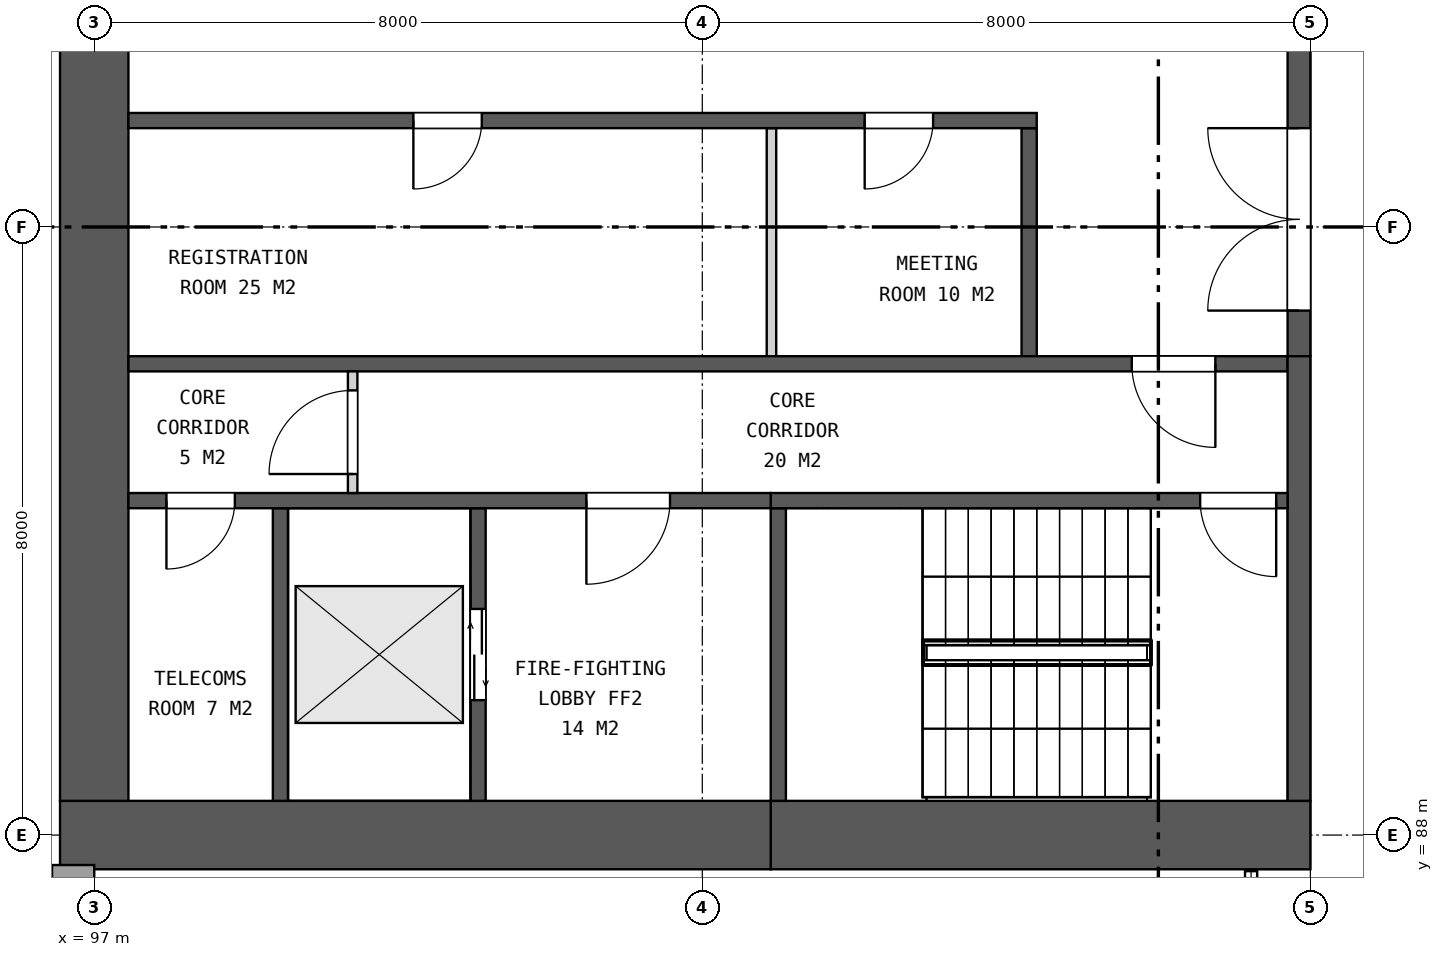
"""IFC4 building model, lengths in metres.
Left out: names, types, materials, properties, quantities, classifications, styles, units other than length and angle.
Written with IfcOpenShell. Run it as: python <this file> out.ifc"""

import sys

from ifc_helpers import new_model, si_unit, direction, frame, frame_2d, origin, place, context, subcontext, project, spatial, rectangle, extrude, element, fill, save


model = new_model("IFC4")
c1 = context("Model", 3, precision=1e-05, world=origin(), true_north=direction((0.0, 1.0)))
c2 = subcontext(c1, "Body", "Model", "MODEL_VIEW")
j1 = project(units=[si_unit("LENGTHUNIT", "METRE"), si_unit("PLANEANGLEUNIT", "RADIAN")], contexts=[c1])
p1 = place(None, origin())
s1 = spatial("IfcSite", under=j1, at=p1, CompositionType="ELEMENT")
p2 = place(p1, origin())
s2 = spatial("IfcBuilding", under=s1, at=p2, CompositionType="ELEMENT")
p3 = place(p2, frame((0.0, 0.0, 25.0)))
s3 = spatial("IfcBuildingStorey", under=s2, at=p3, CompositionType="ELEMENT", Elevation=25.0)
p4 = place(p3, frame((113.0, 88.0, 0.0), z_axis=(0.0, 0.0, 1.0), x_axis=(-1.0, 0.0, 0.0)))
e1 = element("IfcWall", 1, at=p4, inside=s3, PredefinedType="SHEAR", context=c2, shape_type="SweptSolid", body=[
    extrude(rectangle(XDim=7.1, YDim=0.9, at=frame_2d((3.55, 0.0))), origin(), (0.0, 0.0, 1.0), 9.0),
])
p5 = place(p3, frame((105.9, 88.0, 0.0), z_axis=(0.0, 0.0, 1.0), x_axis=(-1.0, 0.0, 0.0)))
e2 = element("IfcWall", 2, at=p5, inside=s3, PredefinedType="SHEAR", context=c2, shape_type="SweptSolid", body=[
    extrude(rectangle(XDim=9.35, YDim=0.9, at=frame_2d((4.675, 0.0))), origin(), (0.0, 0.0, 1.0), 9.0),
])
p6 = place(p3, frame((97.0, 111.55, 0.0), z_axis=(0.0, 0.0, 1.0), x_axis=(0.0, -1.0, 0.0)))
e3 = element("IfcWall", 3, at=p6, inside=s3, PredefinedType="SHEAR", context=c2, shape_type="SweptSolid", body=[
    extrude(rectangle(XDim=23.1, YDim=0.9, at=frame_2d((11.55, 0.0))), origin(), (0.0, 0.0, 1.0), 9.0),
])
p7 = place(p6, frame((10.35, 0.0, 0.0)))
e4 = element("IfcOpeningElement", 4, at=p7, cuts=e3, PredefinedType="OPENING", context=c2, shape_type="SweptSolid", body=[
    extrude(rectangle(XDim=2.4, YDim=2.4, at=frame_2d((1.2, 1.2))), frame((0.0, 0.46, 0.0), z_axis=(0.0, -1.0, 0.0), x_axis=(1.0, 0.0, 0.0)), (0.0, 0.0, 1.0), 0.92),
])
p8 = place(p3, frame((112.85, 105.7, 0.0), z_axis=(0.0, 0.0, 1.0), x_axis=(0.0, -1.0, 0.0)))
e5 = element("IfcWall", 5, at=p8, inside=s3, PredefinedType="SHEAR", context=c2, shape_type="SweptSolid", body=[
    extrude(rectangle(XDim=11.4, YDim=0.3, at=frame_2d((5.7, 0.0))), origin(), (0.0, 0.0, 1.0), 9.0),
])
p9 = place(p8, frame((0.6, 0.0, 0.0)))
e6 = element("IfcOpeningElement", 6, at=p9, cuts=e5, PredefinedType="OPENING", context=c2, shape_type="SweptSolid", body=[
    extrude(rectangle(XDim=2.4, YDim=2.4, at=frame_2d((1.2, 1.2))), frame((0.0, 0.16, 0.0), z_axis=(0.0, -1.0, 0.0), x_axis=(1.0, 0.0, 0.0)), (0.0, 0.0, 1.0), 0.32),
])
p10 = place(p8, frame((4.5, 0.0, 0.0)))
e7 = element("IfcOpeningElement", 7, at=p10, cuts=e5, PredefinedType="OPENING", context=c2, shape_type="SweptSolid", body=[
    extrude(rectangle(XDim=2.4, YDim=2.4, at=frame_2d((1.2, 1.2))), frame((0.0, 0.16, 0.0), z_axis=(0.0, -1.0, 0.0), x_axis=(1.0, 0.0, 0.0)), (0.0, 0.0, 1.0), 0.32),
])
p11 = place(p8, frame((8.4, 0.0, 0.0)))
e8 = element("IfcOpeningElement", 8, at=p11, cuts=e5, PredefinedType="OPENING", context=c2, shape_type="SweptSolid", body=[
    extrude(rectangle(XDim=2.4, YDim=2.4, at=frame_2d((1.2, 1.2))), frame((0.0, 0.16, 0.0), z_axis=(0.0, -1.0, 0.0), x_axis=(1.0, 0.0, 0.0)), (0.0, 0.0, 1.0), 0.32),
])
p12 = place(p3, frame((109.3, 97.3, 0.0), z_axis=(0.0, 0.0, 1.0), x_axis=(0.0, -1.0, 0.0)))
e9 = element("IfcWall", 9, at=p12, inside=s3, PredefinedType="SHEAR", context=c2, shape_type="SweptSolid", body=[
    extrude(rectangle(XDim=3.0, YDim=0.2, at=frame_2d((1.5, 0.0))), origin(), (0.0, 0.0, 1.0), 9.0),
])
p13 = place(p3, frame((105.91, 97.3, 0.0), z_axis=(0.0, 0.0, 1.0), x_axis=(0.0, -1.0, 0.0)))
e10 = element("IfcWall", 10, at=p13, inside=s3, PredefinedType="PARTITIONING", context=c2, shape_type="SweptSolid", body=[
    extrude(rectangle(XDim=3.0, YDim=0.125, at=frame_2d((1.5, 0.0))), origin(), (0.0, 0.0, 1.0), 9.0),
])
p14 = place(p3, frame((109.4, 97.4, 0.0), z_axis=(0.0, 0.0, 1.0), x_axis=(-1.0, 0.0, 0.0)))
e11 = element("IfcWall", 11, at=p14, inside=s3, PredefinedType="SHEAR", context=c2, shape_type="SweptSolid", body=[
    extrude(rectangle(XDim=11.95, YDim=0.2, at=frame_2d((5.975, 0.0))), origin(), (0.0, 0.0, 1.0), 9.0),
])
p15 = place(p14, frame((1.364, 0.0, 0.0)))
e12 = element("IfcOpeningElement", 12, at=p15, cuts=e11, PredefinedType="OPENING", context=c2, shape_type="SweptSolid", body=[
    extrude(rectangle(XDim=0.9, YDim=2.1, at=frame_2d((0.45, 1.05))), frame((0.0, 0.11, 0.0), z_axis=(0.0, -1.0, 0.0), x_axis=(1.0, 0.0, 0.0)), (0.0, 0.0, 1.0), 0.22),
])
p16 = place(p14, frame((7.301, 0.0, 0.0)))
e13 = element("IfcOpeningElement", 13, at=p16, cuts=e11, PredefinedType="OPENING", context=c2, shape_type="SweptSolid", body=[
    extrude(rectangle(XDim=0.9, YDim=2.1, at=frame_2d((0.45, 1.05))), frame((0.0, 0.11, 0.0), z_axis=(0.0, -1.0, 0.0), x_axis=(1.0, 0.0, 0.0)), (0.0, 0.0, 1.0), 0.22),
])
p17 = place(p3, frame((112.7, 94.2, 0.0), z_axis=(0.0, 0.0, 1.0), x_axis=(-1.0, 0.0, 0.0)))
e14 = element("IfcWall", 14, at=p17, inside=s3, PredefinedType="SHEAR", context=c2, shape_type="SweptSolid", body=[
    extrude(rectangle(XDim=15.25, YDim=0.2, at=frame_2d((7.625, 0.0))), origin(), (0.0, 0.0, 1.0), 9.0),
])
p18 = place(p17, frame((0.95, 0.0, 0.0)))
e15 = element("IfcOpeningElement", 15, at=p18, cuts=e14, PredefinedType="OPENING", context=c2, shape_type="SweptSolid", body=[
    extrude(rectangle(XDim=1.1, YDim=2.1, at=frame_2d((0.55, 1.05))), frame((0.0, 0.11, 0.0), z_axis=(0.0, -1.0, 0.0), x_axis=(1.0, 0.0, 0.0)), (0.0, 0.0, 1.0), 0.22),
])
p19 = place(p3, frame((112.85, 94.3, 0.0), z_axis=(0.0, 0.0, 1.0), x_axis=(0.0, -1.0, 0.0)))
e16 = element("IfcWall", 16, at=p19, inside=s3, PredefinedType="SHEAR", context=c2, shape_type="SweptSolid", body=[
    extrude(rectangle(XDim=5.85, YDim=0.3, at=frame_2d((2.925, 0.0))), origin(), (0.0, 0.0, 1.0), 9.0),
])
p20 = place(p3, frame((106.0, 92.3, 0.0), z_axis=(0.0, 0.0, 1.0), x_axis=(0.0, -1.0, 0.0)))
e17 = element("IfcWall", 17, at=p20, inside=s3, PredefinedType="SHEAR", context=c2, shape_type="SweptSolid", body=[
    extrude(rectangle(XDim=3.85, YDim=0.2, at=frame_2d((1.925, 0.0))), origin(), (0.0, 0.0, 1.0), 9.0),
])
p21 = place(p3, frame((102.05, 92.3, 0.0), z_axis=(0.0, 0.0, 1.0), x_axis=(0.0, -1.0, 0.0)))
e18 = element("IfcWall", 18, at=p21, inside=s3, PredefinedType="SHEAR", context=c2, shape_type="SweptSolid", body=[
    extrude(rectangle(XDim=3.85, YDim=0.2, at=frame_2d((1.925, 0.0))), origin(), (0.0, 0.0, 1.0), 9.0),
])
p22 = place(p21, frame((1.325, 0.0, 0.0)))
e19 = element("IfcOpeningElement", 19, at=p22, cuts=e18, PredefinedType="OPENING", context=c2, shape_type="SweptSolid", body=[
    extrude(rectangle(XDim=1.2, YDim=2.1, at=frame_2d((0.6, 1.05))), frame((0.0, 0.11, 0.0), z_axis=(0.0, -1.0, 0.0), x_axis=(1.0, 0.0, 0.0)), (0.0, 0.0, 1.0), 0.22),
])
p23 = place(p3, frame((99.45, 92.3, 0.0), z_axis=(0.0, 0.0, 1.0), x_axis=(0.0, -1.0, 0.0)))
e20 = element("IfcWall", 20, at=p23, inside=s3, PredefinedType="SHEAR", context=c2, shape_type="SweptSolid", body=[
    extrude(rectangle(XDim=3.85, YDim=0.2, at=frame_2d((1.925, 0.0))), origin(), (0.0, 0.0, 1.0), 9.0),
])
p24 = place(p3, frame((112.7, 92.4, 0.0), z_axis=(0.0, 0.0, 1.0), x_axis=(-1.0, 0.0, 0.0)))
e21 = element("IfcWall", 21, at=p24, inside=s3, PredefinedType="SHEAR", context=c2, shape_type="SweptSolid", body=[
    extrude(rectangle(XDim=6.8, YDim=0.2, at=frame_2d((3.4, 0.0))), origin(), (0.0, 0.0, 1.0), 9.0),
])
p25 = place(p24, frame((0.15, 0.0, 0.0)))
e22 = element("IfcOpeningElement", 22, at=p25, cuts=e21, PredefinedType="OPENING", context=c2, shape_type="SweptSolid", body=[
    extrude(rectangle(XDim=1.0, YDim=2.1, at=frame_2d((0.5, 1.05))), frame((0.0, 0.11, 0.0), z_axis=(0.0, -1.0, 0.0), x_axis=(1.0, 0.0, 0.0)), (0.0, 0.0, 1.0), 0.22),
])
p26 = place(p3, frame((105.9, 92.4, 0.0), z_axis=(0.0, 0.0, 1.0), x_axis=(-1.0, 0.0, 0.0)))
e23 = element("IfcWall", 23, at=p26, inside=s3, PredefinedType="SHEAR", context=c2, shape_type="SweptSolid", body=[
    extrude(rectangle(XDim=8.45, YDim=0.2, at=frame_2d((4.225, 0.0))), origin(), (0.0, 0.0, 1.0), 9.0),
])
p27 = place(p26, frame((1.325, 0.0, 0.0)))
e24 = element("IfcOpeningElement", 24, at=p27, cuts=e23, PredefinedType="OPENING", context=c2, shape_type="SweptSolid", body=[
    extrude(rectangle(XDim=1.1, YDim=2.1, at=frame_2d((0.55, 1.05))), frame((0.0, 0.11, 0.0), z_axis=(0.0, -1.0, 0.0), x_axis=(1.0, 0.0, 0.0)), (0.0, 0.0, 1.0), 0.22),
])
p28 = place(p26, frame((7.05, 0.0, 0.0)))
e25 = element("IfcOpeningElement", 25, at=p28, cuts=e23, PredefinedType="OPENING", context=c2, shape_type="SweptSolid", body=[
    extrude(rectangle(XDim=0.9, YDim=2.1, at=frame_2d((0.45, 1.05))), frame((0.0, 0.11, 0.0), z_axis=(0.0, -1.0, 0.0), x_axis=(1.0, 0.0, 0.0)), (0.0, 0.0, 1.0), 0.22),
])
p29 = place(p3, frame((100.4, 94.1, 0.0), z_axis=(0.0, 0.0, 1.0), x_axis=(0.0, -1.0, 0.0)))
e26 = element("IfcWall", 26, at=p29, inside=s3, PredefinedType="PARTITIONING", context=c2, shape_type="SweptSolid", body=[
    extrude(rectangle(XDim=1.6, YDim=0.125, at=frame_2d((0.8, 0.0))), origin(), (0.0, 0.0, 1.0), 9.0),
])
p30 = place(p29, frame((0.25, 0.0, 0.0)))
e27 = element("IfcOpeningElement", 27, at=p30, cuts=e26, PredefinedType="OPENING", context=c2, shape_type="SweptSolid", body=[
    extrude(rectangle(XDim=1.1, YDim=2.1, at=frame_2d((0.55, 1.05))), frame((0.0, 0.073, 0.0), z_axis=(0.0, -1.0, 0.0), x_axis=(1.0, 0.0, 0.0)), (0.0, 0.0, 1.0), 0.145),
])
p31 = place(p3, frame((96.445, 87.453, 0.0), z_axis=(0.0, 0.0, 1.0), x_axis=(1.0, 0.0, 0.0)))
e28 = element("IfcWall", 28, at=p31, inside=s3, PredefinedType="SOLIDWALL", context=c2, shape_type="SweptSolid", body=[
    extrude(rectangle(XDim=0.555, YDim=0.306, at=frame_2d((0.277, 0.0))), origin(), (0.0, 0.0, 1.0), 8.6),
])
p32 = place(p11, frame((2.4, 0.0, 0.0), z_axis=(0.0, 0.0, 1.0), x_axis=(-1.0, 0.0, 0.0)))
e29 = element("IfcDoor", 29, at=p32, inside=s3, OperationType="DOUBLE_DOOR_SINGLE_SWING", PredefinedType="DOOR", context=c2, shape_type="SweptSolid", body=[
    extrude(rectangle(XDim=2.4, YDim=2.4, at=frame_2d((1.2, 1.2))), frame((0.0, 0.025, 0.0), z_axis=(0.0, -1.0, 0.0), x_axis=(1.0, 0.0, 0.0)), (0.0, 0.0, 1.0), 0.05),
])
fill(e8, e29)
p33 = place(p15, origin())
e30 = element("IfcDoor", 30, at=p33, inside=s3, OperationType="SINGLE_SWING_RIGHT", PredefinedType="DOOR", context=c2, shape_type="SweptSolid", body=[
    extrude(rectangle(XDim=0.9, YDim=2.1, at=frame_2d((0.45, 1.05))), frame((0.0, 0.025, 0.0), z_axis=(0.0, -1.0, 0.0), x_axis=(1.0, 0.0, 0.0)), (0.0, 0.0, 1.0), 0.05),
])
fill(e12, e30)
p34 = place(p16, origin())
e31 = element("IfcDoor", 31, at=p34, inside=s3, OperationType="SINGLE_SWING_RIGHT", PredefinedType="DOOR", context=c2, shape_type="SweptSolid", body=[
    extrude(rectangle(XDim=0.9, YDim=2.1, at=frame_2d((0.45, 1.05))), frame((0.0, 0.025, 0.0), z_axis=(0.0, -1.0, 0.0), x_axis=(1.0, 0.0, 0.0)), (0.0, 0.0, 1.0), 0.05),
])
fill(e13, e31)
p35 = place(p18, origin())
e32 = element("IfcDoor", 32, at=p35, inside=s3, OperationType="SINGLE_SWING_LEFT", PredefinedType="DOOR", context=c2, shape_type="SweptSolid", body=[
    extrude(rectangle(XDim=1.1, YDim=2.1, at=frame_2d((0.55, 1.05))), frame((0.0, 0.025, 0.0), z_axis=(0.0, -1.0, 0.0), x_axis=(1.0, 0.0, 0.0)), (0.0, 0.0, 1.0), 0.05),
])
fill(e15, e32)
p36 = place(p22, origin())
e33 = element("IfcDoor", 33, at=p36, inside=s3, OperationType="DOUBLE_DOOR_SLIDING", PredefinedType="DOOR", context=c2, shape_type="SweptSolid", body=[
    extrude(rectangle(XDim=1.2, YDim=2.1, at=frame_2d((0.6, 1.05))), frame((0.0, 0.025, 0.0), z_axis=(0.0, -1.0, 0.0), x_axis=(1.0, 0.0, 0.0)), (0.0, 0.0, 1.0), 0.05),
])
fill(e19, e33)
p37 = place(p25, origin())
e34 = element("IfcDoor", 34, at=p37, inside=s3, OperationType="SINGLE_SWING_LEFT", PredefinedType="DOOR", context=c2, shape_type="SweptSolid", body=[
    extrude(rectangle(XDim=1.0, YDim=2.1, at=frame_2d((0.5, 1.05))), frame((0.0, 0.025, 0.0), z_axis=(0.0, -1.0, 0.0), x_axis=(1.0, 0.0, 0.0)), (0.0, 0.0, 1.0), 0.05),
])
fill(e22, e34)
p38 = place(p27, origin())
e35 = element("IfcDoor", 35, at=p38, inside=s3, OperationType="SINGLE_SWING_RIGHT", PredefinedType="DOOR", context=c2, shape_type="SweptSolid", body=[
    extrude(rectangle(XDim=1.1, YDim=2.1, at=frame_2d((0.55, 1.05))), frame((0.0, 0.025, 0.0), z_axis=(0.0, -1.0, 0.0), x_axis=(1.0, 0.0, 0.0)), (0.0, 0.0, 1.0), 0.05),
])
fill(e24, e35)
p39 = place(p28, origin())
e36 = element("IfcDoor", 36, at=p39, inside=s3, OperationType="SINGLE_SWING_RIGHT", PredefinedType="DOOR", context=c2, shape_type="SweptSolid", body=[
    extrude(rectangle(XDim=0.9, YDim=2.1, at=frame_2d((0.45, 1.05))), frame((0.0, 0.025, 0.0), z_axis=(0.0, -1.0, 0.0), x_axis=(1.0, 0.0, 0.0)), (0.0, 0.0, 1.0), 0.05),
])
fill(e25, e36)
p40 = place(p30, frame((1.1, 0.0, 0.0), z_axis=(0.0, 0.0, 1.0), x_axis=(-1.0, 0.0, 0.0)))
e37 = element("IfcDoor", 37, at=p40, inside=s3, OperationType="SINGLE_SWING_LEFT", PredefinedType="DOOR", context=c2, shape_type="SweptSolid", body=[
    extrude(rectangle(XDim=1.1, YDim=2.1, at=frame_2d((0.55, 1.05))), frame((0.0, 0.025, 0.0), z_axis=(0.0, -1.0, 0.0), x_axis=(1.0, 0.0, 0.0)), (0.0, 0.0, 1.0), 0.05),
])
fill(e27, e37)
save(model, sys.argv[1])
